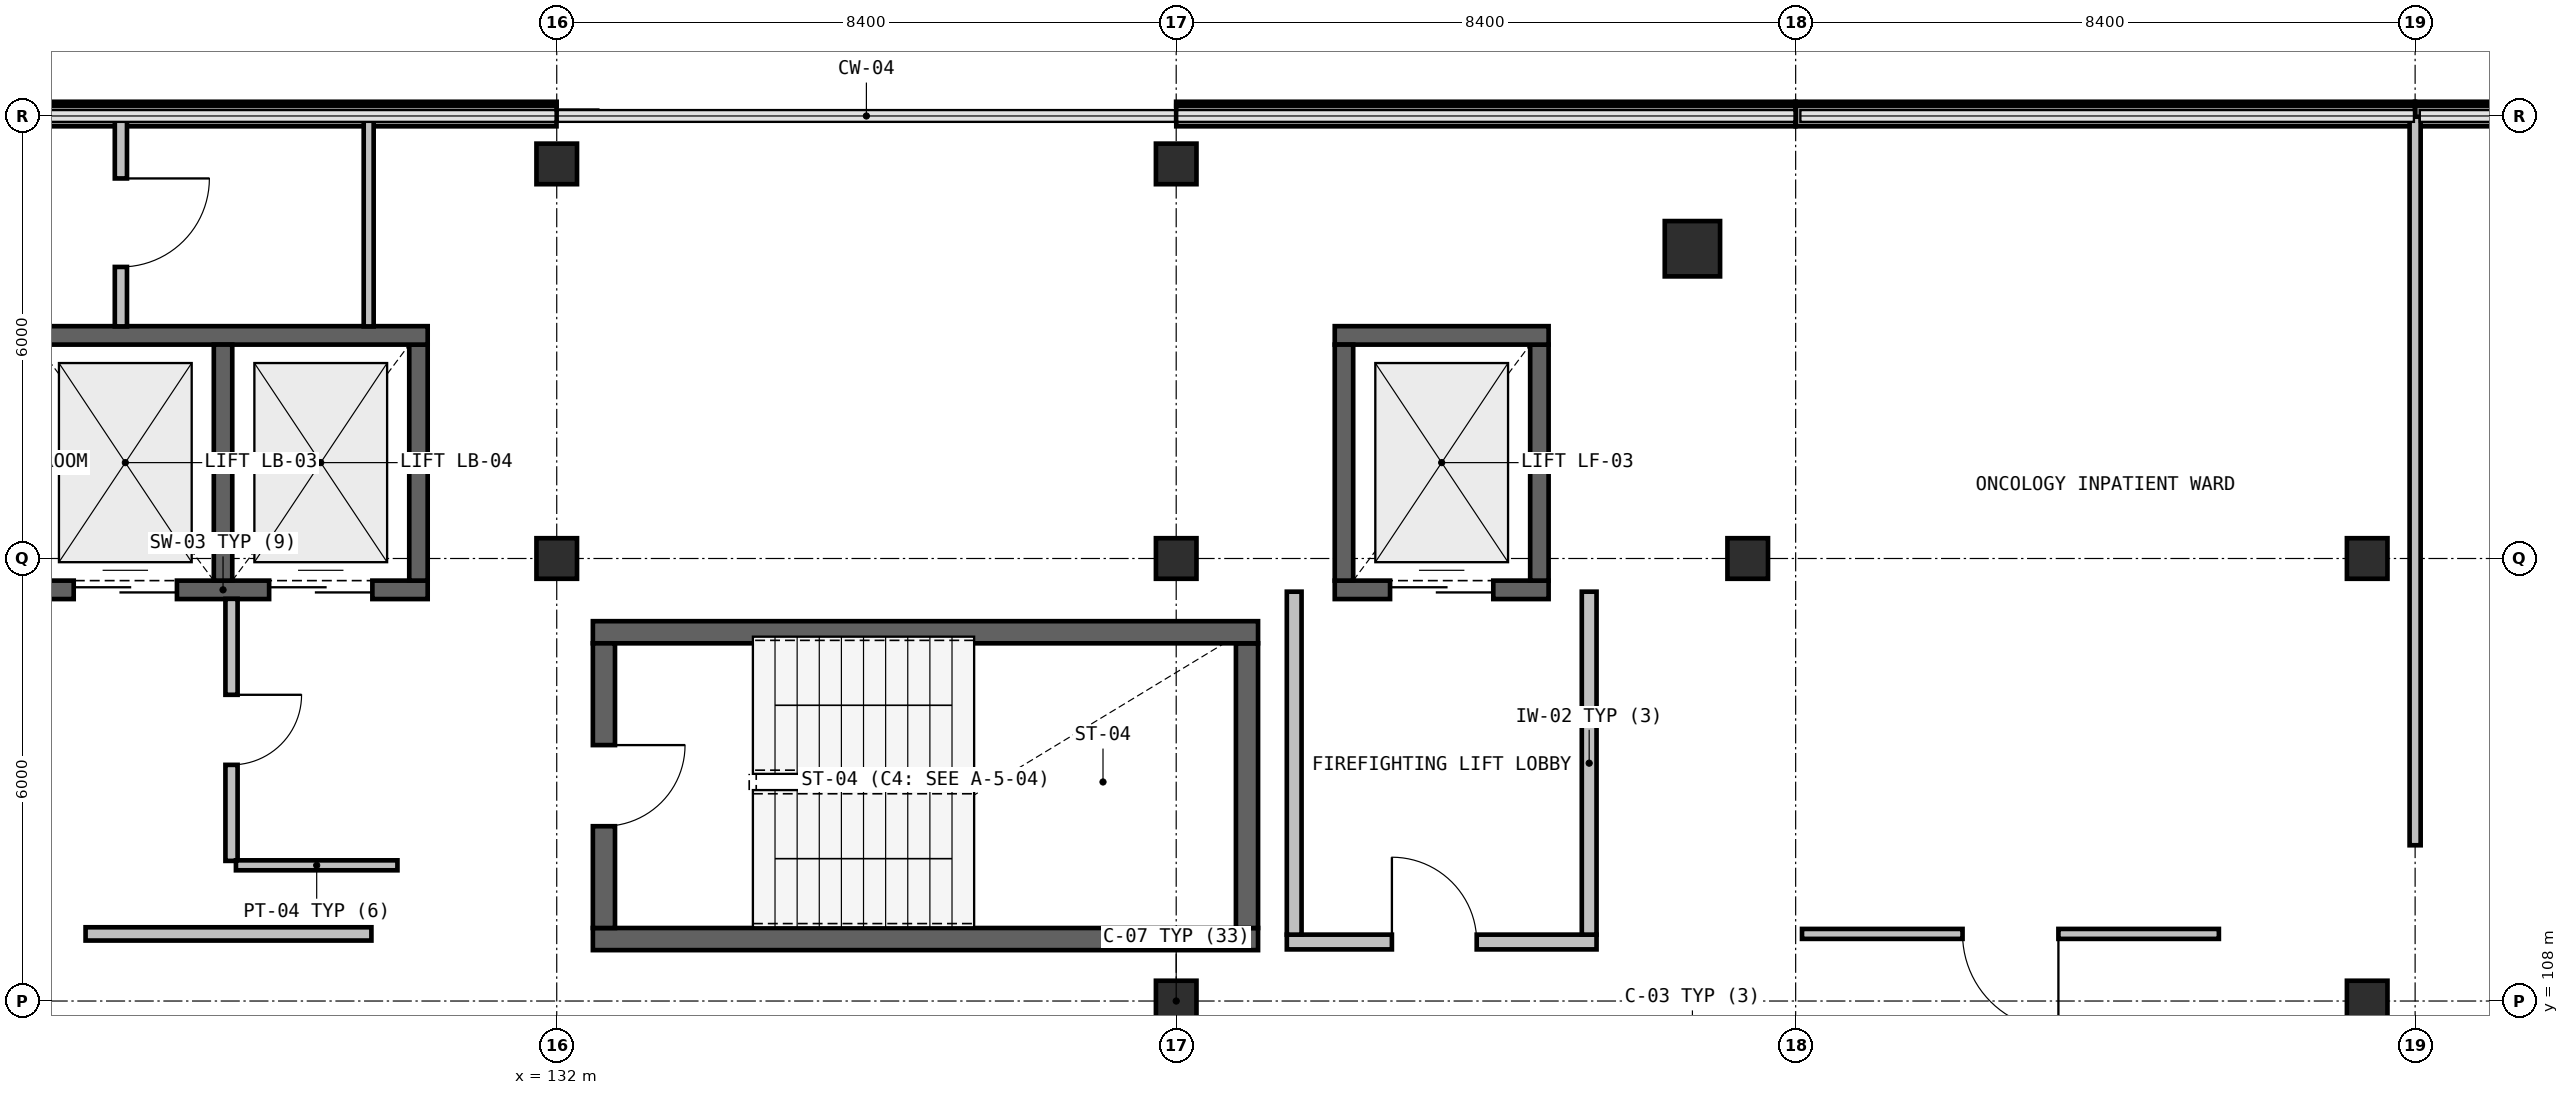
"""IFC4 building model, lengths in metres.
Left out: names, types, materials, properties, quantities, classifications, styles, units other than length and angle.
Written with IfcOpenShell. Run it as: python <this file> out.ifc"""

import sys

from ifc_helpers import new_model, si_unit, direction, frame, frame_2d, origin, origin_2d, place, context, subcontext, project, spatial, rectangle, extrude, element, fill, save


model = new_model("IFC4")
c1 = context("Model", 3, precision=1e-05, world=origin(), true_north=direction((0.0, 1.0)))
c2 = subcontext(c1, "Body", "Model", "MODEL_VIEW")
j1 = project(units=[si_unit("LENGTHUNIT", "METRE"), si_unit("PLANEANGLEUNIT", "RADIAN")], contexts=[c1])
p1 = place(None, origin())
s1 = spatial("IfcSite", under=j1, at=p1, CompositionType="ELEMENT")
p2 = place(p1, origin())
s2 = spatial("IfcBuilding", under=s1, at=p2, CompositionType="ELEMENT")
p3 = place(p2, frame((0.0, 0.0, 31.35)))
s3 = spatial("IfcBuildingStorey", under=s2, at=p3, CompositionType="ELEMENT", Elevation=31.35)
p4 = place(p3, frame((147.4, 118.2, 0.0), z_axis=(0.0, 0.0, 1.0), x_axis=(1.0, 0.0, 0.0)))
e1 = element("IfcColumn", 1, at=p4, inside=s3, PredefinedType="COLUMN", context=c2, shape_type="SweptSolid", body=[
    extrude(rectangle(XDim=0.75, YDim=0.75, at=origin_2d()), origin(), (0.0, 0.0, 1.0), 4.05),
])
for number, where, z_axis, x_axis in (
    (2, (132.0, 114.0, 0.0), (0.0, 0.0, 1.0), (1.0, 0.0, 0.0)),
    (3, (132.0, 119.35, 0.0), (0.0, 0.0, 1.0), (1.0, 0.0, 0.0)),
    (4, (140.4, 108.0, 0.0), (0.0, 0.0, 1.0), (1.0, 0.0, 0.0)),
    (5, (140.4, 114.0, 0.0), (0.0, 0.0, 1.0), (1.0, 0.0, 0.0)),
    (6, (140.4, 119.35, 0.0), (0.0, 0.0, 1.0), (1.0, 0.0, 0.0)),
    (7, (148.15, 114.0, 0.0), (0.0, 0.0, 1.0), (1.0, 0.0, 0.0)),
    (8, (156.55, 108.0, 0.0), (0.0, 0.0, 1.0), (1.0, 0.0, 0.0)),
    (9, (156.55, 114.0, 0.0), (0.0, 0.0, 1.0), (1.0, 0.0, 0.0)),
):
    element("IfcColumn", number, at=place(p3, frame(where, z_axis=z_axis, x_axis=x_axis)), inside=s3, PredefinedType="COLUMN", context=c2, shape_type="SweptSolid", body=[
        extrude(rectangle(XDim=0.55, YDim=0.55, at=origin_2d()), origin(), (0.0, 0.0, 1.0), 4.05),
    ])
p5 = place(p3, frame((123.601, 120.0, 0.0), z_axis=(0.0, 0.0, 1.0), x_axis=(1.0, 0.0, 0.0)))
e10 = element("IfcWall", 10, at=p5, inside=s3, PredefinedType="SOLIDWALL", context=c2, shape_type="SweptSolid", body=[
    extrude(rectangle(XDim=8.396, YDim=0.28, at=frame_2d((4.198, 0.0))), origin(), (0.0, 0.0, 1.0), 0.94),
])
p6 = place(p3, frame((140.401, 120.0, 0.0), z_axis=(0.0, 0.0, 1.0), x_axis=(1.0, 0.0, 0.0)))
e11 = element("IfcWall", 11, at=p6, inside=s3, PredefinedType="SOLIDWALL", context=c2, shape_type="SweptSolid", body=[
    extrude(rectangle(XDim=8.396, YDim=0.28, at=frame_2d((4.198, 0.0))), origin(), (0.0, 0.0, 1.0), 0.94),
])
p7 = place(p3, frame((148.801, 120.0, 0.0), z_axis=(0.0, 0.0, 1.0), x_axis=(1.0, 0.0, 0.0)))
e12 = element("IfcWall", 12, at=p7, inside=s3, PredefinedType="SOLIDWALL", context=c2, shape_type="SweptSolid", body=[
    extrude(rectangle(XDim=8.396, YDim=0.28, at=frame_2d((4.198, 0.0))), origin(), (0.0, 0.0, 1.0), 0.94),
])
p8 = place(p3, frame((157.201, 120.0, 0.0), z_axis=(0.0, 0.0, 1.0), x_axis=(1.0, 0.0, 0.0)))
e13 = element("IfcWall", 13, at=p8, inside=s3, PredefinedType="SOLIDWALL", context=c2, shape_type="SweptSolid", body=[
    extrude(rectangle(XDim=8.258, YDim=0.28, at=frame_2d((4.129, 0.0))), origin(), (0.0, 0.0, 1.0), 0.94),
])
p9 = place(p3, frame((132.49, 108.84, 0.0), z_axis=(0.0, 0.0, 1.0), x_axis=(1.0, 0.0, 0.0)))
e14 = element("IfcWall", 14, at=p9, inside=s3, PredefinedType="SHEAR", context=c2, shape_type="SweptSolid", body=[
    extrude(rectangle(XDim=9.02, YDim=0.3, at=frame_2d((4.51, 0.0))), origin(), (0.0, 0.0, 1.0), 3.785),
])
p10 = place(p3, frame((141.36, 108.99, 0.0), z_axis=(0.0, 0.0, 1.0), x_axis=(0.0, 1.0, 0.0)))
e15 = element("IfcWall", 15, at=p10, inside=s3, PredefinedType="SHEAR", context=c2, shape_type="SweptSolid", body=[
    extrude(rectangle(XDim=3.86, YDim=0.3, at=frame_2d((1.93, 0.0))), origin(), (0.0, 0.0, 1.0), 3.785),
])
p11 = place(p3, frame((141.51, 113.0, 0.0), z_axis=(0.0, 0.0, 1.0), x_axis=(-1.0, 0.0, 0.0)))
e16 = element("IfcWall", 16, at=p11, inside=s3, PredefinedType="SHEAR", context=c2, shape_type="SweptSolid", body=[
    extrude(rectangle(XDim=9.02, YDim=0.3, at=frame_2d((4.51, 0.0))), origin(), (0.0, 0.0, 1.0), 3.785),
])
p12 = place(p3, frame((132.64, 112.85, 0.0), z_axis=(0.0, 0.0, 1.0), x_axis=(0.0, -1.0, 0.0)))
e17 = element("IfcWall", 17, at=p12, inside=s3, PredefinedType="SHEAR", context=c2, shape_type="SweptSolid", body=[
    extrude(rectangle(XDim=3.86, YDim=0.3, at=frame_2d((1.93, 0.0))), origin(), (0.0, 0.0, 1.0), 3.785),
])
p13 = place(p12, frame((1.38, 0.0, 0.0)))
e18 = element("IfcOpeningElement", 18, at=p13, cuts=e17, PredefinedType="OPENING", context=c2, shape_type="SweptSolid", body=[
    extrude(rectangle(XDim=1.1, YDim=2.15, at=frame_2d((0.55, 1.075))), frame((0.0, 0.16, 0.0), z_axis=(0.0, -1.0, 0.0), x_axis=(1.0, 0.0, 0.0)), (0.0, 0.0, 1.0), 0.32),
])
p14 = place(p3, frame((141.9, 108.8, 0.0), z_axis=(0.0, 0.0, 1.0), x_axis=(1.0, 0.0, 0.0)))
e19 = element("IfcWall", 19, at=p14, inside=s3, PredefinedType="SOLIDWALL", context=c2, shape_type="SweptSolid", body=[
    extrude(rectangle(XDim=4.2, YDim=0.2, at=frame_2d((2.1, 0.0))), origin(), (0.0, 0.0, 1.0), 3.785),
])
p15 = place(p14, frame((1.425, 0.0, 0.0)))
e20 = element("IfcOpeningElement", 20, at=p15, cuts=e19, PredefinedType="OPENING", context=c2, shape_type="SweptSolid", body=[
    extrude(rectangle(XDim=1.15, YDim=2.15, at=frame_2d((0.575, 1.075))), frame((0.0, 0.11, 0.0), z_axis=(0.0, -1.0, 0.0), x_axis=(1.0, 0.0, 0.0)), (0.0, 0.0, 1.0), 0.22),
])
for number, where, z_axis, x_axis in (
    (21, (146.0, 108.9, 0.0), (0.0, 0.0, 1.0), (0.0, 1.0, 0.0)),
    (22, (142.0, 113.55, 0.0), (0.0, 0.0, 1.0), (0.0, -1.0, 0.0)),
):
    element("IfcWall", number, at=place(p3, frame(where, z_axis=z_axis, x_axis=x_axis)), inside=s3, PredefinedType="SOLIDWALL", context=c2, shape_type="SweptSolid", body=[
        extrude(rectangle(XDim=4.65, YDim=0.2, at=frame_2d((2.325, 0.0))), origin(), (0.0, 0.0, 1.0), 3.785),
    ])
p16 = place(p3, frame((124.7, 113.575, 0.0), z_axis=(0.0, 0.0, 1.0), x_axis=(1.0, 0.0, 0.0)))
e23 = element("IfcWall", 23, at=p16, inside=s3, PredefinedType="SHEAR", context=c2, shape_type="SweptSolid", body=[
    extrude(rectangle(XDim=5.55, YDim=0.25, at=frame_2d((2.775, 0.0))), origin(), (0.0, 0.0, 1.0), 3.785),
])
p17 = place(p16, frame((0.75, 0.0, 0.0)))
e24 = element("IfcOpeningElement", 24, at=p17, cuts=e23, PredefinedType="OPENING", context=c2, shape_type="SweptSolid", body=[
    extrude(rectangle(XDim=1.4, YDim=2.2, at=frame_2d((0.7, 1.1))), frame((0.0, 0.135, 0.0), z_axis=(0.0, -1.0, 0.0), x_axis=(1.0, 0.0, 0.0)), (0.0, 0.0, 1.0), 0.27),
])
p18 = place(p16, frame((3.4, 0.0, 0.0)))
e25 = element("IfcOpeningElement", 25, at=p18, cuts=e23, PredefinedType="OPENING", context=c2, shape_type="SweptSolid", body=[
    extrude(rectangle(XDim=1.4, YDim=2.2, at=frame_2d((0.7, 1.1))), frame((0.0, 0.135, 0.0), z_axis=(0.0, -1.0, 0.0), x_axis=(1.0, 0.0, 0.0)), (0.0, 0.0, 1.0), 0.27),
])
p19 = place(p3, frame((130.125, 113.7, 0.0), z_axis=(0.0, 0.0, 1.0), x_axis=(0.0, 1.0, 0.0)))
e26 = element("IfcWall", 26, at=p19, inside=s3, PredefinedType="SHEAR", context=c2, shape_type="SweptSolid", body=[
    extrude(rectangle(XDim=3.2, YDim=0.25, at=frame_2d((1.6, 0.0))), origin(), (0.0, 0.0, 1.0), 3.785),
])
p20 = place(p3, frame((130.25, 117.025, 0.0), z_axis=(0.0, 0.0, 1.0), x_axis=(-1.0, 0.0, 0.0)))
e27 = element("IfcWall", 27, at=p20, inside=s3, PredefinedType="SHEAR", context=c2, shape_type="SweptSolid", body=[
    extrude(rectangle(XDim=5.55, YDim=0.25, at=frame_2d((2.775, 0.0))), origin(), (0.0, 0.0, 1.0), 3.785),
])
p21 = place(p3, frame((127.475, 113.7, 0.0), z_axis=(0.0, 0.0, 1.0), x_axis=(0.0, 1.0, 0.0)))
e28 = element("IfcWall", 28, at=p21, inside=s3, PredefinedType="SHEAR", context=c2, shape_type="SweptSolid", body=[
    extrude(rectangle(XDim=3.2, YDim=0.25, at=frame_2d((1.6, 0.0))), origin(), (0.0, 0.0, 1.0), 3.785),
])
p22 = place(p3, frame((142.55, 113.575, 0.0), z_axis=(0.0, 0.0, 1.0), x_axis=(1.0, 0.0, 0.0)))
e29 = element("IfcWall", 29, at=p22, inside=s3, PredefinedType="SHEAR", context=c2, shape_type="SweptSolid", body=[
    extrude(rectangle(XDim=2.9, YDim=0.25, at=frame_2d((1.45, 0.0))), origin(), (0.0, 0.0, 1.0), 3.785),
])
p23 = place(p22, frame((0.75, 0.0, 0.0)))
e30 = element("IfcOpeningElement", 30, at=p23, cuts=e29, PredefinedType="OPENING", context=c2, shape_type="SweptSolid", body=[
    extrude(rectangle(XDim=1.4, YDim=2.15, at=frame_2d((0.7, 1.075))), frame((0.0, 0.135, 0.0), z_axis=(0.0, -1.0, 0.0), x_axis=(1.0, 0.0, 0.0)), (0.0, 0.0, 1.0), 0.27),
])
p24 = place(p3, frame((145.325, 113.7, 0.0), z_axis=(0.0, 0.0, 1.0), x_axis=(0.0, 1.0, 0.0)))
e31 = element("IfcWall", 31, at=p24, inside=s3, PredefinedType="SHEAR", context=c2, shape_type="SweptSolid", body=[
    extrude(rectangle(XDim=3.2, YDim=0.25, at=frame_2d((1.6, 0.0))), origin(), (0.0, 0.0, 1.0), 3.785),
])
p25 = place(p3, frame((145.45, 117.025, 0.0), z_axis=(0.0, 0.0, 1.0), x_axis=(-1.0, 0.0, 0.0)))
e32 = element("IfcWall", 32, at=p25, inside=s3, PredefinedType="SHEAR", context=c2, shape_type="SweptSolid", body=[
    extrude(rectangle(XDim=2.9, YDim=0.25, at=frame_2d((1.45, 0.0))), origin(), (0.0, 0.0, 1.0), 3.785),
])
p26 = place(p3, frame((142.675, 116.9, 0.0), z_axis=(0.0, 0.0, 1.0), x_axis=(0.0, -1.0, 0.0)))
e33 = element("IfcWall", 33, at=p26, inside=s3, PredefinedType="SHEAR", context=c2, shape_type="SweptSolid", body=[
    extrude(rectangle(XDim=3.2, YDim=0.25, at=frame_2d((1.6, 0.0))), origin(), (0.0, 0.0, 1.0), 3.785),
])
p27 = place(p3, frame((127.59, 113.453, 0.0), z_axis=(0.0, 0.0, 1.0), x_axis=(0.0, -1.0, 0.0)))
e34 = element("IfcWall", 34, at=p27, inside=s3, PredefinedType="PARTITIONING", context=c2, shape_type="SweptSolid", body=[
    extrude(rectangle(XDim=3.553, YDim=0.165, at=frame_2d((1.776, 0.0))), origin(), (0.0, 0.0, 1.0), 3.785),
])
p28 = place(p27, frame((1.301, 0.0, 0.0)))
e35 = element("IfcOpeningElement", 35, at=p28, cuts=e34, PredefinedType="OPENING", context=c2, shape_type="SweptSolid", body=[
    extrude(rectangle(XDim=0.95, YDim=2.1, at=frame_2d((0.475, 1.05))), frame((0.0, 0.093, 0.0), z_axis=(0.0, -1.0, 0.0), x_axis=(1.0, 0.0, 0.0)), (0.0, 0.0, 1.0), 0.185),
])
p29 = place(p3, frame((127.65, 109.84, 0.0), z_axis=(0.0, 0.0, 1.0), x_axis=(1.0, 0.0, 0.0)))
e36 = element("IfcWall", 36, at=p29, inside=s3, PredefinedType="PARTITIONING", context=c2, shape_type="SweptSolid", body=[
    extrude(rectangle(XDim=2.19, YDim=0.135, at=frame_2d((1.095, 0.0))), origin(), (0.0, 0.0, 1.0), 3.785),
])
p30 = place(p3, frame((129.487, 108.91, 0.0), z_axis=(0.0, 0.0, 1.0), x_axis=(-1.0, 0.0, 0.0)))
e37 = element("IfcWall", 37, at=p30, inside=s3, PredefinedType="PARTITIONING", context=c2, shape_type="SweptSolid", body=[
    extrude(rectangle(XDim=3.876, YDim=0.18, at=frame_2d((1.938, 0.0))), origin(), (0.0, 0.0, 1.0), 3.785),
])
p31 = place(p3, frame((126.09, 119.958, 0.0), z_axis=(0.0, 0.0, 1.0), x_axis=(0.0, -1.0, 0.0)))
e38 = element("IfcWall", 38, at=p31, inside=s3, PredefinedType="PARTITIONING", context=c2, shape_type="SweptSolid", body=[
    extrude(rectangle(XDim=2.811, YDim=0.165, at=frame_2d((1.406, 0.0))), origin(), (0.0, 0.0, 1.0), 3.785),
])
p32 = place(p31, frame((0.805, 0.0, 0.0)))
e39 = element("IfcOpeningElement", 39, at=p32, cuts=e38, PredefinedType="OPENING", context=c2, shape_type="SweptSolid", body=[
    extrude(rectangle(XDim=1.2, YDim=2.15, at=frame_2d((0.6, 1.075))), frame((0.0, 0.093, 0.0), z_axis=(0.0, -1.0, 0.0), x_axis=(1.0, 0.0, 0.0)), (0.0, 0.0, 1.0), 0.185),
])
p33 = place(p3, frame((129.45, 119.958, 0.0), z_axis=(0.0, 0.0, 1.0), x_axis=(0.0, -1.0, 0.0)))
e40 = element("IfcWall", 40, at=p33, inside=s3, PredefinedType="PARTITIONING", context=c2, shape_type="SweptSolid", body=[
    extrude(rectangle(XDim=2.811, YDim=0.135, at=frame_2d((1.406, 0.0))), origin(), (0.0, 0.0, 1.0), 3.785),
])
p34 = place(p3, frame((157.2, 119.99, 0.0), z_axis=(0.0, 0.0, 1.0), x_axis=(0.0, -1.0, 0.0)))
e41 = element("IfcWall", 41, at=p34, inside=s3, PredefinedType="PARTITIONING", context=c2, shape_type="SweptSolid", body=[
    extrude(rectangle(XDim=9.878, YDim=0.15, at=frame_2d((4.939, 0.0))), origin(), (0.0, 0.0, 1.0), 3.785),
])
p35 = place(p3, frame((154.539, 108.91, 0.0), z_axis=(0.0, 0.0, 1.0), x_axis=(-1.0, 0.0, 0.0)))
e42 = element("IfcWall", 42, at=p35, inside=s3, PredefinedType="PARTITIONING", context=c2, shape_type="SweptSolid", body=[
    extrude(rectangle(XDim=5.653, YDim=0.135, at=frame_2d((2.827, 0.0))), origin(), (0.0, 0.0, 1.0), 3.785),
])
p36 = place(p35, frame((2.176, 0.0, 0.0)))
e43 = element("IfcOpeningElement", 43, at=p36, cuts=e42, PredefinedType="OPENING", context=c2, shape_type="SweptSolid", body=[
    extrude(rectangle(XDim=1.3, YDim=2.15, at=frame_2d((0.65, 1.075))), frame((0.0, 0.077, 0.0), z_axis=(0.0, -1.0, 0.0), x_axis=(1.0, 0.0, 0.0)), (0.0, 0.0, 1.0), 0.155),
])
p37 = place(p13, origin())
e44 = element("IfcDoor", 44, at=p37, inside=s3, OperationType="SINGLE_SWING_RIGHT", PredefinedType="DOOR", context=c2, shape_type="SweptSolid", body=[
    extrude(rectangle(XDim=1.1, YDim=2.15, at=frame_2d((0.55, 1.075))), frame((0.0, 0.025, 0.0), z_axis=(0.0, -1.0, 0.0), x_axis=(1.0, 0.0, 0.0)), (0.0, 0.0, 1.0), 0.05),
])
fill(e18, e44)
p38 = place(p15, origin())
e45 = element("IfcDoor", 45, at=p38, inside=s3, OperationType="SINGLE_SWING_LEFT", PredefinedType="DOOR", context=c2, shape_type="SweptSolid", body=[
    extrude(rectangle(XDim=1.15, YDim=2.15, at=frame_2d((0.575, 1.075))), frame((0.0, 0.025, 0.0), z_axis=(0.0, -1.0, 0.0), x_axis=(1.0, 0.0, 0.0)), (0.0, 0.0, 1.0), 0.05),
])
fill(e20, e45)
p39 = place(p17, origin())
e46 = element("IfcDoor", 46, at=p39, inside=s3, OperationType="DOUBLE_DOOR_SLIDING", PredefinedType="DOOR", context=c2, shape_type="SweptSolid", body=[
    extrude(rectangle(XDim=1.4, YDim=2.2, at=frame_2d((0.7, 1.1))), frame((0.0, 0.025, 0.0), z_axis=(0.0, -1.0, 0.0), x_axis=(1.0, 0.0, 0.0)), (0.0, 0.0, 1.0), 0.05),
])
fill(e24, e46)
p40 = place(p18, origin())
e47 = element("IfcDoor", 47, at=p40, inside=s3, OperationType="DOUBLE_DOOR_SLIDING", PredefinedType="DOOR", context=c2, shape_type="SweptSolid", body=[
    extrude(rectangle(XDim=1.4, YDim=2.2, at=frame_2d((0.7, 1.1))), frame((0.0, 0.025, 0.0), z_axis=(0.0, -1.0, 0.0), x_axis=(1.0, 0.0, 0.0)), (0.0, 0.0, 1.0), 0.05),
])
fill(e25, e47)
p41 = place(p23, origin())
e48 = element("IfcDoor", 48, at=p41, inside=s3, OperationType="DOUBLE_DOOR_SLIDING", PredefinedType="DOOR", context=c2, shape_type="SweptSolid", body=[
    extrude(rectangle(XDim=1.4, YDim=2.15, at=frame_2d((0.7, 1.075))), frame((0.0, 0.025, 0.0), z_axis=(0.0, -1.0, 0.0), x_axis=(1.0, 0.0, 0.0)), (0.0, 0.0, 1.0), 0.05),
])
fill(e30, e48)
p42 = place(p28, origin())
e49 = element("IfcDoor", 49, at=p42, inside=s3, OperationType="SINGLE_SWING_LEFT", PredefinedType="DOOR", context=c2, shape_type="SweptSolid", body=[
    extrude(rectangle(XDim=0.95, YDim=2.1, at=frame_2d((0.475, 1.05))), frame((0.0, 0.025, 0.0), z_axis=(0.0, -1.0, 0.0), x_axis=(1.0, 0.0, 0.0)), (0.0, 0.0, 1.0), 0.05),
])
fill(e35, e49)
p43 = place(p32, origin())
e50 = element("IfcDoor", 50, at=p43, inside=s3, OperationType="SINGLE_SWING_RIGHT", PredefinedType="DOOR", context=c2, shape_type="SweptSolid", body=[
    extrude(rectangle(XDim=1.2, YDim=2.15, at=frame_2d((0.6, 1.075))), frame((0.0, 0.025, 0.0), z_axis=(0.0, -1.0, 0.0), x_axis=(1.0, 0.0, 0.0)), (0.0, 0.0, 1.0), 0.05),
])
fill(e39, e50)
p44 = place(p36, origin())
e51 = element("IfcDoor", 51, at=p44, inside=s3, OperationType="SINGLE_SWING_LEFT", PredefinedType="DOOR", context=c2, shape_type="SweptSolid", body=[
    extrude(rectangle(XDim=1.3, YDim=2.15, at=frame_2d((0.65, 1.075))), frame((0.0, 0.025, 0.0), z_axis=(0.0, -1.0, 0.0), x_axis=(1.0, 0.0, 0.0)), (0.0, 0.0, 1.0), 0.05),
])
fill(e43, e51)
save(model, sys.argv[1])
